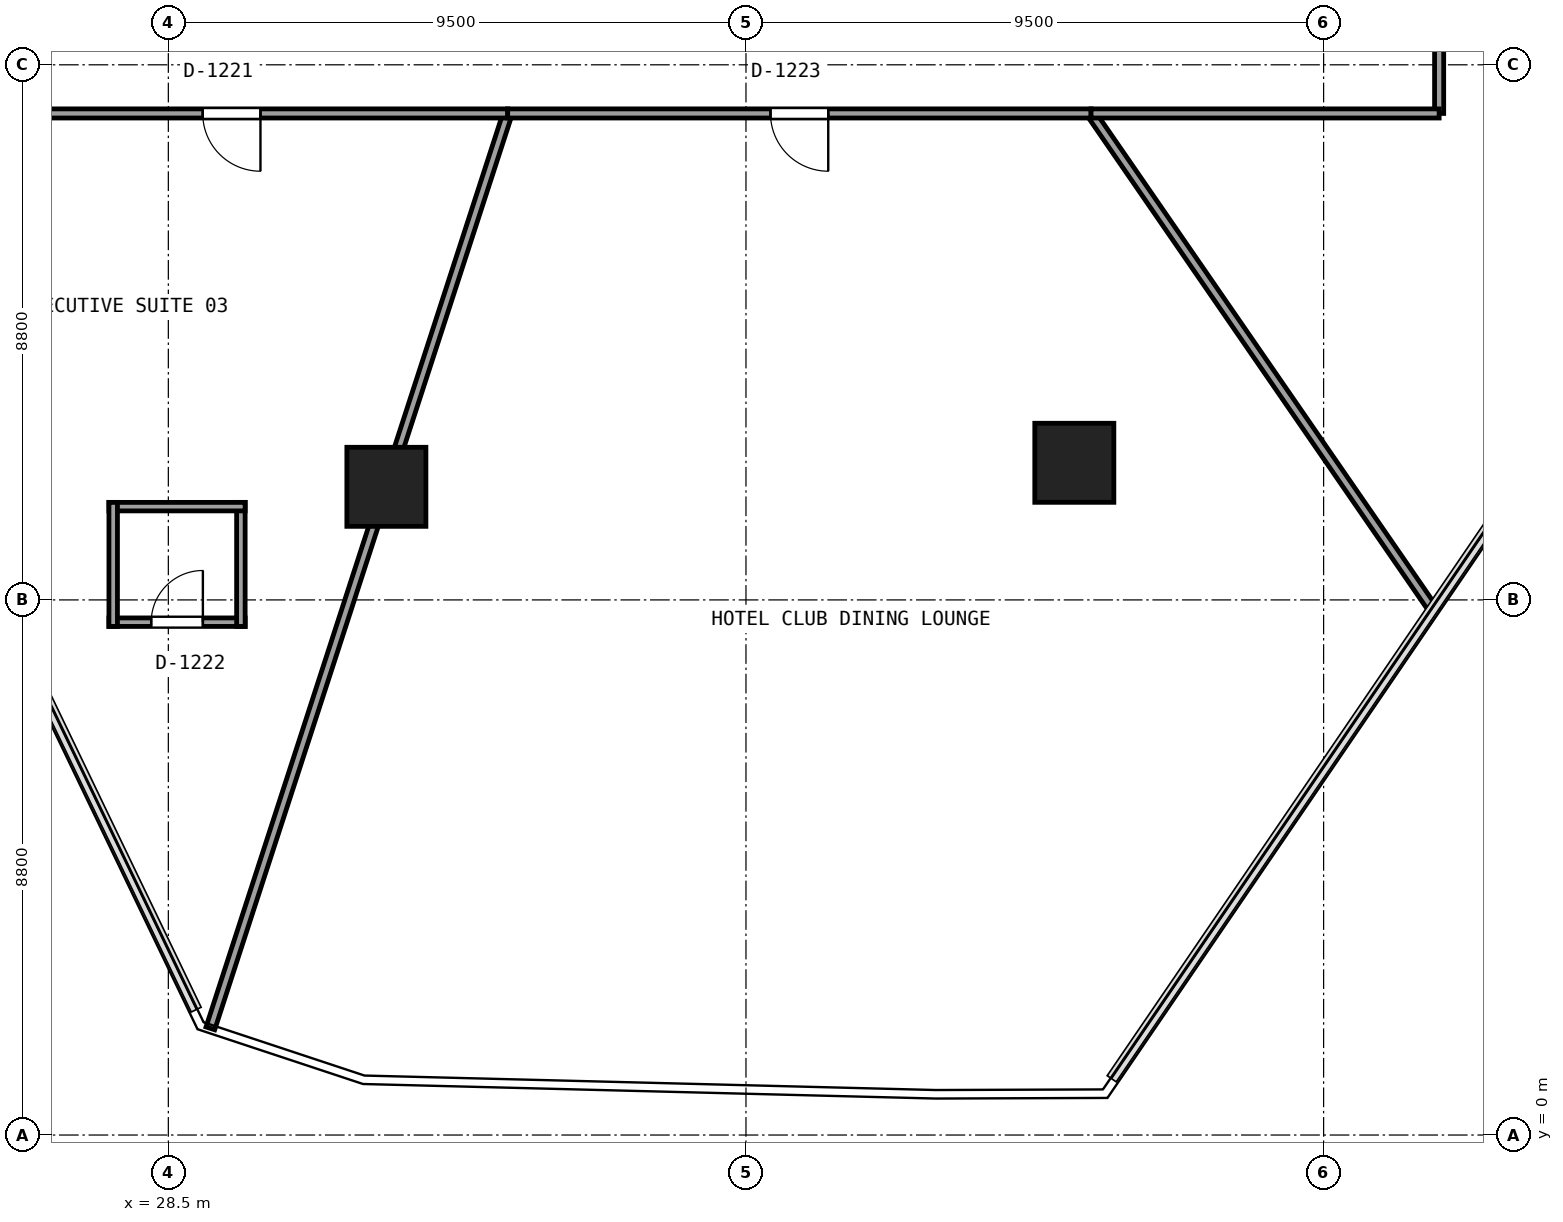
"""IFC4 building model, lengths in metres.
Left out: names, types, materials, properties, quantities, classifications, styles, units other than length and angle.
Written with IfcOpenShell. Run it as: python <this file> out.ifc"""

import sys

from ifc_helpers import new_model, si_unit, direction, frame, frame_2d, origin, origin_2d, place, context, subcontext, project, spatial, rectangle, extrude, element, fill, save


model = new_model("IFC4")
c1 = context("Model", 3, precision=1e-05, world=origin(), true_north=direction((0.0, 1.0)))
c2 = subcontext(c1, "Body", "Model", "MODEL_VIEW")
j1 = project(units=[si_unit("LENGTHUNIT", "METRE"), si_unit("PLANEANGLEUNIT", "RADIAN")], contexts=[c1])
p1 = place(None, origin())
s1 = spatial("IfcSite", under=j1, at=p1, CompositionType="ELEMENT")
p2 = place(p1, origin())
s2 = spatial("IfcBuilding", under=s1, at=p2, CompositionType="ELEMENT")
p3 = place(p2, frame((0.0, 0.0, 51.15)))
s3 = spatial("IfcBuildingStorey", under=s2, at=p3, CompositionType="ELEMENT", Elevation=51.15)
for number, where, z_axis, x_axis in (
    (1, (32.086, 10.66, 0.0), (0.0, 0.0, 1.0), (1.0, 0.0, 0.0)),
    (2, (43.4, 11.055, 0.0), (0.0, 0.0, 1.0), (1.0, 0.0, 0.0)),
):
    element("IfcColumn", number, at=place(p3, frame(where, z_axis=z_axis, x_axis=x_axis)), inside=s3, PredefinedType="COLUMN", context=c2, shape_type="SweptSolid", body=[
        extrude(rectangle(XDim=1.3, YDim=1.3, at=origin_2d()), origin(), (0.0, 0.0, 1.0), 3.17),
    ])
p4 = place(p3, frame((27.523, 8.434, 0.0), z_axis=(0.0, 0.0, 1.0), x_axis=(1.0, 0.0, 0.0)))
e3 = element("IfcWall", 3, at=p4, inside=s3, PredefinedType="PARTITIONING", context=c2, shape_type="SweptSolid", body=[
    extrude(rectangle(XDim=2.24, YDim=0.14, at=frame_2d((1.12, 0.0))), origin(), (0.0, 0.0, 1.0), 3.17),
])
p5 = place(p4, frame((0.695, 0.0, 0.0)))
e4 = element("IfcOpeningElement", 4, at=p5, cuts=e3, PredefinedType="OPENING", context=c2, shape_type="SweptSolid", body=[
    extrude(rectangle(XDim=0.85, YDim=2.1, at=frame_2d((0.425, 1.05))), frame((0.0, 0.08, 0.0), z_axis=(0.0, -1.0, 0.0), x_axis=(1.0, 0.0, 0.0)), (0.0, 0.0, 1.0), 0.16),
])
p6 = place(p3, frame((29.693, 8.364, 0.0), z_axis=(0.0, 0.0, 1.0), x_axis=(0.0, 1.0, 0.0)))
e5 = element("IfcWall", 5, at=p6, inside=s3, PredefinedType="PARTITIONING", context=c2, shape_type="SweptSolid", body=[
    extrude(rectangle(XDim=2.04, YDim=0.14, at=frame_2d((1.02, 0.0))), origin(), (0.0, 0.0, 1.0), 3.17),
])
p7 = place(p3, frame((29.763, 10.334, 0.0), z_axis=(0.0, 0.0, 1.0), x_axis=(-1.0, 0.0, 0.0)))
e6 = element("IfcWall", 6, at=p7, inside=s3, PredefinedType="PARTITIONING", context=c2, shape_type="SweptSolid", body=[
    extrude(rectangle(XDim=2.24, YDim=0.14, at=frame_2d((1.12, 0.0))), origin(), (0.0, 0.0, 1.0), 3.17),
])
p8 = place(p3, frame((27.593, 10.404, 0.0), z_axis=(0.0, 0.0, 1.0), x_axis=(0.0, -1.0, 0.0)))
e7 = element("IfcWall", 7, at=p8, inside=s3, PredefinedType="PARTITIONING", context=c2, shape_type="SweptSolid", body=[
    extrude(rectangle(XDim=2.04, YDim=0.14, at=frame_2d((1.02, 0.0))), origin(), (0.0, 0.0, 1.0), 3.17),
])
p9 = place(p3, frame((29.191, 1.754, 0.0), z_axis=(0.0, 0.0, 1.0), x_axis=(0.309094097783, 0.951031460424, 0.0)))
e8 = element("IfcWall", 8, at=p9, inside=s3, PredefinedType="PARTITIONING", context=c2, shape_type="SweptSolid", body=[
    extrude(rectangle(XDim=15.821, YDim=0.15, at=frame_2d((7.91, 0.0))), origin(), (0.0, 0.0, 1.0), 2.395),
])
p10 = place(p3, frame((34.081, 16.8, 0.0), z_axis=(0.0, 0.0, 1.0), x_axis=(-1.0, 0.0, 0.0)))
e9 = element("IfcWall", 9, at=p10, inside=s3, PredefinedType="PARTITIONING", context=c2, shape_type="SweptSolid", body=[
    extrude(rectangle(XDim=9.081, YDim=0.15, at=frame_2d((4.541, 0.0))), origin(), (0.0, 0.0, 1.0), 2.355),
])
p11 = place(p10, frame((4.066, 0.0, 0.0)))
e10 = element("IfcOpeningElement", 10, at=p11, cuts=e9, PredefinedType="OPENING", context=c2, shape_type="SweptSolid", body=[
    extrude(rectangle(XDim=0.95, YDim=2.15, at=frame_2d((0.475, 1.075))), frame((0.0, 0.085, 0.0), z_axis=(0.0, -1.0, 0.0), x_axis=(1.0, 0.0, 0.0)), (0.0, 0.0, 1.0), 0.17),
])
p12 = place(p3, frame((49.32, 8.615, 0.0), z_axis=(0.0, 0.0, 1.0), x_axis=(-0.567743283975, 0.823205662943, 0.0)))
e11 = element("IfcWall", 11, at=p12, inside=s3, PredefinedType="PARTITIONING", context=c2, shape_type="SweptSolid", body=[
    extrude(rectangle(XDim=9.943, YDim=0.15, at=frame_2d((4.971, 0.0))), origin(), (0.0, 0.0, 1.0), 2.355),
])
p13 = place(p3, frame((43.675, 16.8, 0.0), z_axis=(0.0, 0.0, 1.0), x_axis=(-1.0, 0.0, 0.0)))
e12 = element("IfcWall", 12, at=p13, inside=s3, PredefinedType="PARTITIONING", context=c2, shape_type="SweptSolid", body=[
    extrude(rectangle(XDim=9.594, YDim=0.15, at=frame_2d((4.797, 0.0))), origin(), (0.0, 0.0, 1.0), 2.395),
])
p14 = place(p13, frame((4.322, 0.0, 0.0)))
e13 = element("IfcOpeningElement", 13, at=p14, cuts=e12, PredefinedType="OPENING", context=c2, shape_type="SweptSolid", body=[
    extrude(rectangle(XDim=0.95, YDim=2.15, at=frame_2d((0.475, 1.075))), frame((0.0, 0.085, 0.0), z_axis=(0.0, -1.0, 0.0), x_axis=(1.0, 0.0, 0.0)), (0.0, 0.0, 1.0), 0.17),
])
p15 = place(p3, frame((49.4, 18.6, 0.0), z_axis=(0.0, 0.0, 1.0), x_axis=(0.0, -1.0, 0.0)))
e14 = element("IfcWall", 14, at=p15, inside=s3, PredefinedType="PARTITIONING", context=c2, shape_type="SweptSolid", body=[
    extrude(rectangle(XDim=1.8, YDim=0.15, at=frame_2d((0.9, 0.0))), origin(), (0.0, 0.0, 1.0), 2.355),
])
p16 = place(p3, frame((49.4, 16.8, 0.0), z_axis=(0.0, 0.0, 1.0), x_axis=(-1.0, 0.0, 0.0)))
e15 = element("IfcWall", 15, at=p16, inside=s3, PredefinedType="PARTITIONING", context=c2, shape_type="SweptSolid", body=[
    extrude(rectangle(XDim=5.725, YDim=0.15, at=frame_2d((2.862, 0.0))), origin(), (0.0, 0.0, 1.0), 2.355),
])
p17 = place(p11, origin())
e16 = element("IfcDoor", 16, at=p17, inside=s3, OperationType="SINGLE_SWING_LEFT", PredefinedType="DOOR", context=c2, shape_type="SweptSolid", body=[
    extrude(rectangle(XDim=0.95, YDim=2.15, at=frame_2d((0.475, 1.075))), frame((0.0, 0.025, 0.0), z_axis=(0.0, -1.0, 0.0), x_axis=(1.0, 0.0, 0.0)), (0.0, 0.0, 1.0), 0.05),
])
fill(e10, e16)
p18 = place(p5, origin())
e17 = element("IfcDoor", 17, at=p18, inside=s3, OperationType="SINGLE_SWING_RIGHT", PredefinedType="DOOR", context=c2, shape_type="SweptSolid", body=[
    extrude(rectangle(XDim=0.85, YDim=2.1, at=frame_2d((0.425, 1.05))), frame((0.0, 0.025, 0.0), z_axis=(0.0, -1.0, 0.0), x_axis=(1.0, 0.0, 0.0)), (0.0, 0.0, 1.0), 0.05),
])
fill(e4, e17)
p19 = place(p14, origin())
e18 = element("IfcDoor", 18, at=p19, inside=s3, OperationType="SINGLE_SWING_LEFT", PredefinedType="DOOR", context=c2, shape_type="SweptSolid", body=[
    extrude(rectangle(XDim=0.95, YDim=2.15, at=frame_2d((0.475, 1.075))), frame((0.0, 0.025, 0.0), z_axis=(0.0, -1.0, 0.0), x_axis=(1.0, 0.0, 0.0)), (0.0, 0.0, 1.0), 0.05),
])
fill(e13, e18)
save(model, sys.argv[1])
